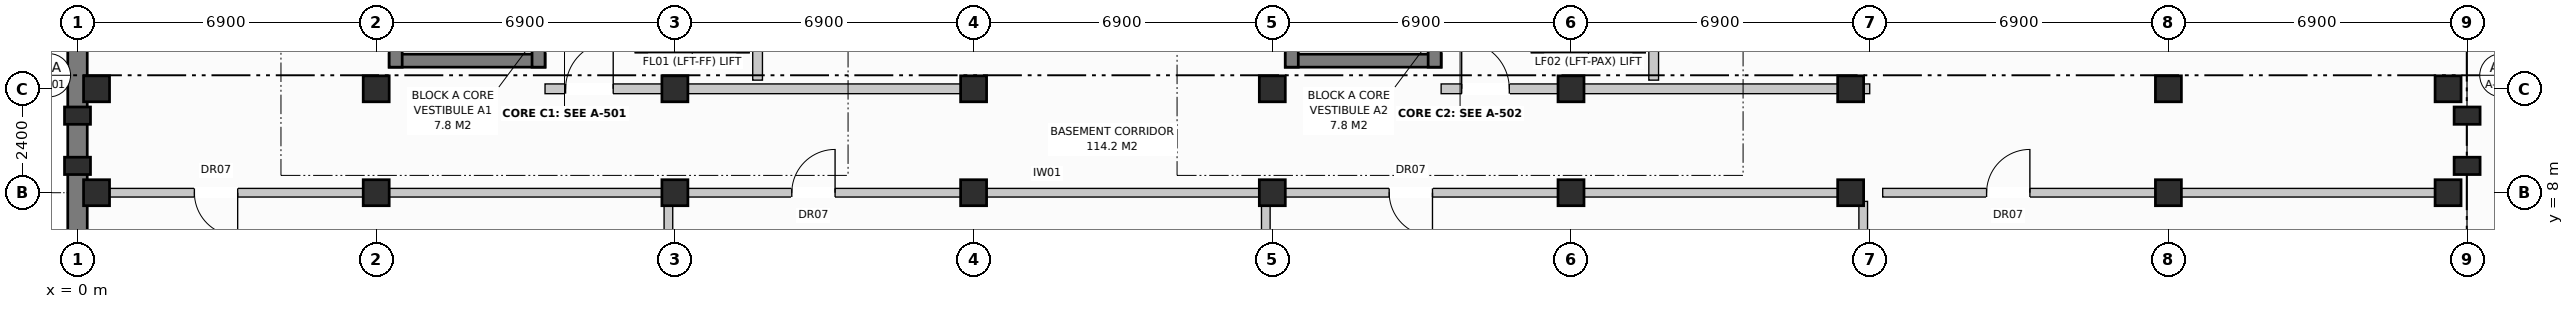
"""IFC4 building model, lengths in metres.
Left out: names, types, materials, properties, quantities, classifications, styles, units other than length and angle.
Written with IfcOpenShell. Run it as: python <this file> out.ifc"""

import sys

from ifc_helpers import new_model, si_unit, direction, frame, frame_2d, origin, origin_with_axes, origin_2d, place, context, subcontext, project, spatial, rectangle, extrude, element, fill, save


model = new_model("IFC4")
c1 = context("Model", 3, precision=1e-05, world=origin(), true_north=direction((0.0, 1.0)))
c2 = subcontext(c1, "Body", "Model", "MODEL_VIEW")
j1 = project(units=[si_unit("LENGTHUNIT", "METRE"), si_unit("PLANEANGLEUNIT", "RADIAN")], contexts=[c1])
p1 = place(None, origin())
s1 = spatial("IfcSite", under=j1, at=p1, CompositionType="ELEMENT")
p2 = place(p1, origin())
s2 = spatial("IfcBuilding", under=s1, at=p2, CompositionType="ELEMENT")
p3 = place(p2, frame((0.0, 0.0, -3.8)))
s3 = spatial("IfcBuildingStorey", under=s2, at=p3, CompositionType="ELEMENT", Elevation=-3.8)
for number, where, z_axis, x_axis in (
    (1, (0.44, 8.0, 0.0), (0.0, 0.0, 1.0), (1.0, 0.0, 0.0)),
    (2, (0.44, 10.4, 0.0), (0.0, 0.0, 1.0), (1.0, 0.0, 0.0)),
    (3, (6.9, 8.0, 0.0), (0.0, 0.0, 1.0), (1.0, 0.0, 0.0)),
    (4, (6.9, 10.4, 0.0), (0.0, 0.0, 1.0), (1.0, 0.0, 0.0)),
    (5, (13.8, 8.0, 0.0), (0.0, 0.0, 1.0), (1.0, 0.0, 0.0)),
    (6, (13.8, 10.4, 0.0), (0.0, 0.0, 1.0), (1.0, 0.0, 0.0)),
    (7, (20.7, 8.0, 0.0), (0.0, 0.0, 1.0), (1.0, 0.0, 0.0)),
    (8, (20.7, 10.4, 0.0), (0.0, 0.0, 1.0), (1.0, 0.0, 0.0)),
    (9, (27.6, 8.0, 0.0), (0.0, 0.0, 1.0), (1.0, 0.0, 0.0)),
    (10, (27.6, 10.4, 0.0), (0.0, 0.0, 1.0), (1.0, 0.0, 0.0)),
    (11, (34.5, 8.0, 0.0), (0.0, 0.0, 1.0), (1.0, 0.0, 0.0)),
    (12, (34.5, 10.4, 0.0), (0.0, 0.0, 1.0), (1.0, 0.0, 0.0)),
    (13, (40.96, 8.0, 0.0), (0.0, 0.0, 1.0), (1.0, 0.0, 0.0)),
    (14, (40.96, 10.4, 0.0), (0.0, 0.0, 1.0), (1.0, 0.0, 0.0)),
    (15, (48.3, 8.0, 0.0), (0.0, 0.0, 1.0), (1.0, 0.0, 0.0)),
    (16, (48.3, 10.4, 0.0), (0.0, 0.0, 1.0), (1.0, 0.0, 0.0)),
    (17, (54.76, 8.0, 0.0), (0.0, 0.0, 1.0), (1.0, 0.0, 0.0)),
    (18, (54.76, 10.4, 0.0), (0.0, 0.0, 1.0), (1.0, 0.0, 0.0)),
):
    element("IfcColumn", number, at=place(p3, frame(where, z_axis=z_axis, x_axis=x_axis)), inside=s3, PredefinedType="COLUMN", context=c2, shape_type="SweptSolid", body=[
        extrude(rectangle(XDim=0.6, YDim=0.6, at=origin_2d()), origin(), (0.0, 0.0, 1.0), 3.8),
    ])
for number, where, z_axis, x_axis in (
    (19, (0.0, 8.62, 0.0), (0.0, 0.0, 1.0), (0.0, 1.0, 0.0)),
    (20, (0.0, 9.78, 0.0), (0.0, 0.0, 1.0), (0.0, 1.0, 0.0)),
    (21, (55.2, 8.62, 0.0), (0.0, 0.0, 1.0), (0.0, 1.0, 0.0)),
    (22, (55.2, 9.78, 0.0), (0.0, 0.0, 1.0), (0.0, 1.0, 0.0)),
):
    element("IfcColumn", number, at=place(p3, frame(where, z_axis=z_axis, x_axis=x_axis)), inside=s3, PredefinedType="PILASTER", context=c2, shape_type="SweptSolid", body=[
        extrude(rectangle(XDim=0.4, YDim=0.6, at=origin_2d()), origin(), (0.0, 0.0, 1.0), 3.8),
    ])
p4 = place(p3, frame((0.0, 116.0, 0.0), z_axis=(0.0, 0.0, 1.0), x_axis=(0.0, -1.0, 0.0)))
e23 = element("IfcWall", 23, at=p4, inside=s3, PredefinedType="STANDARD", context=c2, shape_type="SweptSolid", body=[
    extrude(rectangle(XDim=116.0, YDim=0.45, at=frame_2d((58.0, 0.0))), origin(), (0.0, 0.0, 1.0), 3.48),
])
p5 = place(p3, frame((7.2, 11.05, 0.0), z_axis=(0.0, 0.0, 1.0), x_axis=(1.0, 0.0, 0.0)))
e24 = element("IfcWall", 24, at=p5, inside=s3, PredefinedType="SHEAR", context=c2, shape_type="SweptSolid", body=[
    extrude(rectangle(XDim=3.6, YDim=0.3, at=frame_2d((1.8, 0.0))), origin(), (0.0, 0.0, 1.0), 3.48),
])
p6 = place(p3, frame((7.35, 10.9, 0.0), z_axis=(0.0, 0.0, 1.0), x_axis=(0.0, 1.0, 0.0)))
e25 = element("IfcWall", 25, at=p6, inside=s3, PredefinedType="SHEAR", context=c2, shape_type="SweptSolid", body=[
    extrude(rectangle(XDim=7.5, YDim=0.3, at=frame_2d((3.75, 0.0))), origin(), (0.0, 0.0, 1.0), 3.48),
])
p7 = place(p3, frame((10.65, 10.9, 0.0), z_axis=(0.0, 0.0, 1.0), x_axis=(0.0, 1.0, 0.0)))
e26 = element("IfcWall", 26, at=p7, inside=s3, PredefinedType="SHEAR", context=c2, shape_type="SweptSolid", body=[
    extrude(rectangle(XDim=7.5, YDim=0.3, at=frame_2d((3.75, 0.0))), origin(), (0.0, 0.0, 1.0), 3.48),
])
p8 = place(p7, frame((5.7, 0.0, 0.0)))
e27 = element("IfcOpeningElement", 27, at=p8, cuts=e26, PredefinedType="OPENING", context=c2, shape_type="SweptSolid", body=[
    extrude(rectangle(XDim=1.15, YDim=2.15, at=frame_2d((0.575, 1.075))), frame((0.0, 0.162, 0.0), z_axis=(0.0, -1.0, 0.0), x_axis=(1.0, 0.0, 0.0)), (0.0, 0.0, 1.0), 0.324),
])
p9 = place(p3, frame((15.71, 10.6, 0.0), z_axis=(0.0, 0.0, 1.0), x_axis=(0.0, 1.0, 0.0)))
e28 = element("IfcWall", 28, at=p9, inside=s3, PredefinedType="PARTITIONING", context=c2, shape_type="SweptSolid", body=[
    extrude(rectangle(XDim=7.6, YDim=0.225, at=frame_2d((3.8, 0.0))), origin(), (0.0, 0.0, 1.0), 3.19),
])
p10 = place(p3, frame((6.9, 10.4, 0.0), z_axis=(0.0, 0.0, 1.0), x_axis=(1.0, 0.0, 0.0)))
e29 = element("IfcWall", 29, at=p10, inside=s3, PredefinedType="PARTITIONING", context=c2, shape_type="SweptSolid", body=[
    extrude(rectangle(XDim=0.3, YDim=0.225, at=frame_2d((0.15, 0.0))), origin(), (0.0, 0.0, 1.0), 3.48),
])
p11 = place(p3, frame((10.8, 10.4, 0.0), z_axis=(0.0, 0.0, 1.0), x_axis=(1.0, 0.0, 0.0)))
e30 = element("IfcWall", 30, at=p11, inside=s3, PredefinedType="PARTITIONING", context=c2, shape_type="SweptSolid", body=[
    extrude(rectangle(XDim=9.9, YDim=0.225, at=frame_2d((4.95, 0.0))), origin(), (0.0, 0.0, 1.0), 2.92),
])
p12 = place(p11, frame((0.475, 0.0, 0.0)))
e31 = element("IfcOpeningElement", 31, at=p12, cuts=e30, PredefinedType="OPENING", context=c2, shape_type="SweptSolid", body=[
    extrude(rectangle(XDim=1.1, YDim=2.15, at=frame_2d((0.55, 1.075))), frame((0.0, 0.125, 0.0), z_axis=(0.0, -1.0, 0.0), x_axis=(1.0, 0.0, 0.0)), (0.0, 0.0, 1.0), 0.249),
])
p13 = place(p3, frame((27.9, 11.05, 0.0), z_axis=(0.0, 0.0, 1.0), x_axis=(1.0, 0.0, 0.0)))
e32 = element("IfcWall", 32, at=p13, inside=s3, PredefinedType="SHEAR", context=c2, shape_type="SweptSolid", body=[
    extrude(rectangle(XDim=3.6, YDim=0.3, at=frame_2d((1.8, 0.0))), origin(), (0.0, 0.0, 1.0), 3.48),
])
p14 = place(p3, frame((28.05, 10.9, 0.0), z_axis=(0.0, 0.0, 1.0), x_axis=(0.0, 1.0, 0.0)))
e33 = element("IfcWall", 33, at=p14, inside=s3, PredefinedType="SHEAR", context=c2, shape_type="SweptSolid", body=[
    extrude(rectangle(XDim=7.5, YDim=0.3, at=frame_2d((3.75, 0.0))), origin(), (0.0, 0.0, 1.0), 3.48),
])
p15 = place(p3, frame((31.35, 10.9, 0.0), z_axis=(0.0, 0.0, 1.0), x_axis=(0.0, 1.0, 0.0)))
e34 = element("IfcWall", 34, at=p15, inside=s3, PredefinedType="SHEAR", context=c2, shape_type="SweptSolid", body=[
    extrude(rectangle(XDim=7.5, YDim=0.3, at=frame_2d((3.75, 0.0))), origin(), (0.0, 0.0, 1.0), 3.48),
])
p16 = place(p15, frame((5.7, 0.0, 0.0)))
e35 = element("IfcOpeningElement", 35, at=p16, cuts=e34, PredefinedType="OPENING", context=c2, shape_type="SweptSolid", body=[
    extrude(rectangle(XDim=1.15, YDim=2.15, at=frame_2d((0.575, 1.075))), frame((0.0, 0.162, 0.0), z_axis=(0.0, -1.0, 0.0), x_axis=(1.0, 0.0, 0.0)), (0.0, 0.0, 1.0), 0.324),
])
p17 = place(p3, frame((36.41, 10.6, 0.0), z_axis=(0.0, 0.0, 1.0), x_axis=(0.0, 1.0, 0.0)))
e36 = element("IfcWall", 36, at=p17, inside=s3, PredefinedType="PARTITIONING", context=c2, shape_type="SweptSolid", body=[
    extrude(rectangle(XDim=7.6, YDim=0.225, at=frame_2d((3.8, 0.0))), origin(), (0.0, 0.0, 1.0), 3.19),
])
p18 = place(p3, frame((27.6, 10.4, 0.0), z_axis=(0.0, 0.0, 1.0), x_axis=(1.0, 0.0, 0.0)))
e37 = element("IfcWall", 37, at=p18, inside=s3, PredefinedType="PARTITIONING", context=c2, shape_type="SweptSolid", body=[
    extrude(rectangle(XDim=0.3, YDim=0.225, at=frame_2d((0.15, 0.0))), origin(), (0.0, 0.0, 1.0), 3.48),
])
p19 = place(p3, frame((31.5, 10.4, 0.0), z_axis=(0.0, 0.0, 1.0), x_axis=(1.0, 0.0, 0.0)))
e38 = element("IfcWall", 38, at=p19, inside=s3, PredefinedType="PARTITIONING", context=c2, shape_type="SweptSolid", body=[
    extrude(rectangle(XDim=9.9, YDim=0.225, at=frame_2d((4.95, 0.0))), origin(), (0.0, 0.0, 1.0), 2.92),
])
p20 = place(p19, frame((0.475, 0.0, 0.0)))
e39 = element("IfcOpeningElement", 39, at=p20, cuts=e38, PredefinedType="OPENING", context=c2, shape_type="SweptSolid", body=[
    extrude(rectangle(XDim=1.1, YDim=2.15, at=frame_2d((0.55, 1.075))), frame((0.0, 0.125, 0.0), z_axis=(0.0, -1.0, 0.0), x_axis=(1.0, 0.0, 0.0)), (0.0, 0.0, 1.0), 0.249),
])
p21 = place(p3, frame((0.3, 8.0, 0.0), z_axis=(0.0, 0.0, 1.0), x_axis=(1.0, 0.0, 0.0)))
e40 = element("IfcWall", 40, at=p21, inside=s3, PredefinedType="PARTITIONING", context=c2, shape_type="SweptSolid", body=[
    extrude(rectangle(XDim=13.2, YDim=0.2, at=frame_2d((6.6, 0.0))), origin(), (0.0, 0.0, 1.0), 2.92),
])
p22 = place(p21, frame((2.4, 0.0, 0.0)))
e41 = element("IfcOpeningElement", 41, at=p22, cuts=e40, PredefinedType="OPENING", context=c2, shape_type="SweptSolid", body=[
    extrude(rectangle(XDim=1.0, YDim=2.15, at=frame_2d((0.5, 1.075))), frame((0.0, 0.112, 0.0), z_axis=(0.0, -1.0, 0.0), x_axis=(1.0, 0.0, 0.0)), (0.0, 0.0, 1.0), 0.224),
])
p23 = place(p3, frame((13.65, 0.3, 0.0), z_axis=(0.0, 0.0, 1.0), x_axis=(0.0, 1.0, 0.0)))
e42 = element("IfcWall", 42, at=p23, inside=s3, PredefinedType="PARTITIONING", context=c2, shape_type="SweptSolid", body=[
    extrude(rectangle(XDim=7.5, YDim=0.2, at=frame_2d((3.75, 0.0))), origin(), (0.0, 0.0, 1.0), 3.48),
])
p24 = place(p3, frame((14.1, 8.0, 0.0), z_axis=(0.0, 0.0, 1.0), x_axis=(1.0, 0.0, 0.0)))
e43 = element("IfcWall", 43, at=p24, inside=s3, PredefinedType="PARTITIONING", context=c2, shape_type="SweptSolid", body=[
    extrude(rectangle(XDim=13.2, YDim=0.2, at=frame_2d((6.6, 0.0))), origin(), (0.0, 0.0, 1.0), 2.92),
])
p25 = place(p24, frame((2.4, 0.0, 0.0)))
e44 = element("IfcOpeningElement", 44, at=p25, cuts=e43, PredefinedType="OPENING", context=c2, shape_type="SweptSolid", body=[
    extrude(rectangle(XDim=1.0, YDim=2.15, at=frame_2d((0.5, 1.075))), frame((0.0, 0.112, 0.0), z_axis=(0.0, -1.0, 0.0), x_axis=(1.0, 0.0, 0.0)), (0.0, 0.0, 1.0), 0.224),
])
p26 = place(p3, frame((27.45, 0.3, 0.0), z_axis=(0.0, 0.0, 1.0), x_axis=(0.0, 1.0, 0.0)))
e45 = element("IfcWall", 45, at=p26, inside=s3, PredefinedType="PARTITIONING", context=c2, shape_type="SweptSolid", body=[
    extrude(rectangle(XDim=7.5, YDim=0.2, at=frame_2d((3.75, 0.0))), origin(), (0.0, 0.0, 1.0), 3.48),
])
p27 = place(p3, frame((27.9, 8.0, 0.0), z_axis=(0.0, 0.0, 1.0), x_axis=(1.0, 0.0, 0.0)))
e46 = element("IfcWall", 46, at=p27, inside=s3, PredefinedType="PARTITIONING", context=c2, shape_type="SweptSolid", body=[
    extrude(rectangle(XDim=13.2, YDim=0.2, at=frame_2d((6.6, 0.0))), origin(), (0.0, 0.0, 1.0), 2.92),
])
p28 = place(p27, frame((2.4, 0.0, 0.0)))
e47 = element("IfcOpeningElement", 47, at=p28, cuts=e46, PredefinedType="OPENING", context=c2, shape_type="SweptSolid", body=[
    extrude(rectangle(XDim=1.0, YDim=2.15, at=frame_2d((0.5, 1.075))), frame((0.0, 0.112, 0.0), z_axis=(0.0, -1.0, 0.0), x_axis=(1.0, 0.0, 0.0)), (0.0, 0.0, 1.0), 0.224),
])
p29 = place(p3, frame((41.25, 0.3, 0.0), z_axis=(0.0, 0.0, 1.0), x_axis=(0.0, 1.0, 0.0)))
e48 = element("IfcWall", 48, at=p29, inside=s3, PredefinedType="PARTITIONING", context=c2, shape_type="SweptSolid", body=[
    extrude(rectangle(XDim=7.5, YDim=0.2, at=frame_2d((3.75, 0.0))), origin(), (0.0, 0.0, 1.0), 3.48),
])
p30 = place(p3, frame((41.7, 8.0, 0.0), z_axis=(0.0, 0.0, 1.0), x_axis=(1.0, 0.0, 0.0)))
e49 = element("IfcWall", 49, at=p30, inside=s3, PredefinedType="PARTITIONING", context=c2, shape_type="SweptSolid", body=[
    extrude(rectangle(XDim=13.2, YDim=0.2, at=frame_2d((6.6, 0.0))), origin(), (0.0, 0.0, 1.0), 2.92),
])
p31 = place(p30, frame((2.4, 0.0, 0.0)))
e50 = element("IfcOpeningElement", 50, at=p31, cuts=e49, PredefinedType="OPENING", context=c2, shape_type="SweptSolid", body=[
    extrude(rectangle(XDim=1.0, YDim=2.15, at=frame_2d((0.5, 1.075))), frame((0.0, 0.112, 0.0), z_axis=(0.0, -1.0, 0.0), x_axis=(1.0, 0.0, 0.0)), (0.0, 0.0, 1.0), 0.224),
])
p32 = place(p12, origin_with_axes())
e51 = element("IfcDoor", 51, at=p32, inside=s3, OperationType="SINGLE_SWING_RIGHT", PredefinedType="DOOR", context=c2, shape_type="SweptSolid", body=[
    extrude(rectangle(XDim=1.1, YDim=2.15, at=frame_2d((0.55, 1.075))), frame((0.0, 0.025, 0.0), z_axis=(0.0, -1.0, 0.0), x_axis=(1.0, 0.0, 0.0)), (0.0, 0.0, 1.0), 0.05),
])
fill(e31, e51)
p33 = place(p20, origin_with_axes())
e52 = element("IfcDoor", 52, at=p33, inside=s3, OperationType="SINGLE_SWING_LEFT", PredefinedType="DOOR", context=c2, shape_type="SweptSolid", body=[
    extrude(rectangle(XDim=1.1, YDim=2.15, at=frame_2d((0.55, 1.075))), frame((0.0, 0.025, 0.0), z_axis=(0.0, -1.0, 0.0), x_axis=(1.0, 0.0, 0.0)), (0.0, 0.0, 1.0), 0.05),
])
fill(e39, e52)
p34 = place(p22, frame((1.0, 0.0, 0.0), z_axis=(0.0, 0.0, 1.0), x_axis=(-1.0, 0.0, 0.0)))
e53 = element("IfcDoor", 53, at=p34, inside=s3, OperationType="SINGLE_SWING_RIGHT", PredefinedType="DOOR", context=c2, shape_type="SweptSolid", body=[
    extrude(rectangle(XDim=1.0, YDim=2.15, at=frame_2d((0.5, 1.075))), frame((0.0, 0.025, 0.0), z_axis=(0.0, -1.0, 0.0), x_axis=(1.0, 0.0, 0.0)), (0.0, 0.0, 1.0), 0.05),
])
fill(e41, e53)
p35 = place(p25, origin_with_axes())
e54 = element("IfcDoor", 54, at=p35, inside=s3, OperationType="SINGLE_SWING_RIGHT", PredefinedType="DOOR", context=c2, shape_type="SweptSolid", body=[
    extrude(rectangle(XDim=1.0, YDim=2.15, at=frame_2d((0.5, 1.075))), frame((0.0, 0.025, 0.0), z_axis=(0.0, -1.0, 0.0), x_axis=(1.0, 0.0, 0.0)), (0.0, 0.0, 1.0), 0.05),
])
fill(e44, e54)
p36 = place(p28, frame((1.0, 0.0, 0.0), z_axis=(0.0, 0.0, 1.0), x_axis=(-1.0, 0.0, 0.0)))
e55 = element("IfcDoor", 55, at=p36, inside=s3, OperationType="SINGLE_SWING_RIGHT", PredefinedType="DOOR", context=c2, shape_type="SweptSolid", body=[
    extrude(rectangle(XDim=1.0, YDim=2.15, at=frame_2d((0.5, 1.075))), frame((0.0, 0.025, 0.0), z_axis=(0.0, -1.0, 0.0), x_axis=(1.0, 0.0, 0.0)), (0.0, 0.0, 1.0), 0.05),
])
fill(e47, e55)
p37 = place(p31, origin_with_axes())
e56 = element("IfcDoor", 56, at=p37, inside=s3, OperationType="SINGLE_SWING_RIGHT", PredefinedType="DOOR", context=c2, shape_type="SweptSolid", body=[
    extrude(rectangle(XDim=1.0, YDim=2.15, at=frame_2d((0.5, 1.075))), frame((0.0, 0.025, 0.0), z_axis=(0.0, -1.0, 0.0), x_axis=(1.0, 0.0, 0.0)), (0.0, 0.0, 1.0), 0.05),
])
fill(e50, e56)
save(model, sys.argv[1])
